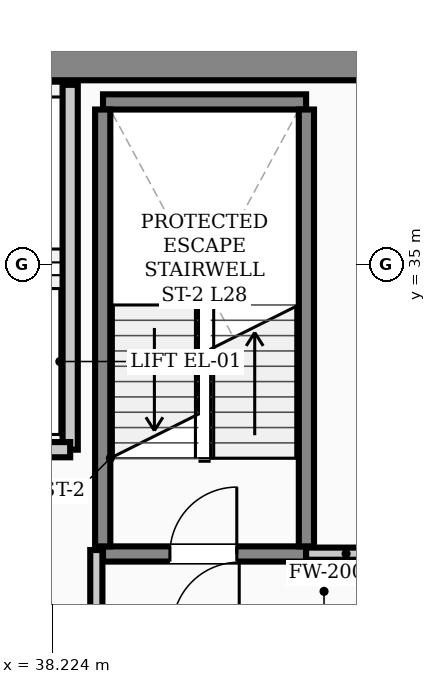
"""IFC4 building model, lengths in metres.
Left out: names, types, materials, properties, quantities, classifications, styles, units other than length and angle.
Written with IfcOpenShell. Run it as: python <this file> out.ifc"""

import sys

from ifc_helpers import new_model, si_unit, direction, frame, frame_2d, origin, place, context, subcontext, project, spatial, rectangle, extrude, element, fill, save


model = new_model("IFC4")
c1 = context("Model", 3, precision=1e-05, world=origin(), true_north=direction((0.0, 1.0)))
c2 = subcontext(c1, "Body", "Model", "MODEL_VIEW")
j1 = project(units=[si_unit("LENGTHUNIT", "METRE"), si_unit("PLANEANGLEUNIT", "RADIAN")], contexts=[c1])
p1 = place(None, origin())
s1 = spatial("IfcSite", under=j1, at=p1, CompositionType="ELEMENT")
p2 = place(p1, origin())
s2 = spatial("IfcBuilding", under=s1, at=p2, CompositionType="ELEMENT")
p3 = place(p2, frame((0.0, 0.0, 114.9)))
s3 = spatial("IfcBuildingStorey", under=s2, at=p3, CompositionType="ELEMENT", Elevation=114.9)
p4 = place(p3, frame((13.5, 38.3, 0.0), z_axis=(0.0, 0.0, 1.0), x_axis=(1.0, 0.0, 0.0)))
e1 = element("IfcWall", 1, at=p4, inside=s3, PredefinedType="SHEAR", context=c2, shape_type="SweptSolid", body=[
    extrude(rectangle(XDim=30.5, YDim=0.55, at=frame_2d((15.25, 0.0))), origin(), (0.0, 0.0, 1.0), 3.72),
])
p5 = place(p3, frame((39.06, 30.235, 0.0), z_axis=(0.0, 0.0, 1.0), x_axis=(1.0, 0.0, 0.0)))
e2 = element("IfcWall", 2, at=p5, inside=s3, PredefinedType="STANDARD", context=c2, shape_type="SweptSolid", body=[
    extrude(rectangle(XDim=3.34, YDim=0.25, at=frame_2d((1.67, 0.0))), origin(), (0.0, 0.0, 1.0), 3.72),
])
p6 = place(p5, frame((1.1, 0.0, 0.0)))
e3 = element("IfcOpeningElement", 3, at=p6, cuts=e2, PredefinedType="OPENING", context=c2, shape_type="SweptSolid", body=[
    extrude(rectangle(XDim=1.1, YDim=2.08, at=frame_2d((0.55, 1.04))), frame((0.0, 0.135, 0.0), z_axis=(0.0, -1.0, 0.0), x_axis=(1.0, 0.0, 0.0)), (0.0, 0.0, 1.0), 0.27),
])
p7 = place(p3, frame((39.06, 37.669, 0.0), z_axis=(0.0, 0.0, 1.0), x_axis=(1.0, 0.0, 0.0)))
e4 = element("IfcWall", 4, at=p7, inside=s3, PredefinedType="STANDARD", context=c2, shape_type="SweptSolid", body=[
    extrude(rectangle(XDim=3.34, YDim=0.25, at=frame_2d((1.67, 0.0))), origin(), (0.0, 0.0, 1.0), 3.72),
])
for number, where, z_axis, x_axis in (
    (5, (39.055, 30.36, 0.0), (0.0, 0.0, 1.0), (0.0, 1.0, 0.0)),
    (6, (42.405, 30.36, 0.0), (0.0, 0.0, 1.0), (0.0, 1.0, 0.0)),
):
    element("IfcWall", number, at=place(p3, frame(where, z_axis=z_axis, x_axis=x_axis)), inside=s3, PredefinedType="STANDARD", context=c2, shape_type="SweptSolid", body=[
        extrude(rectangle(XDim=7.184, YDim=0.25, at=frame_2d((3.592, 0.0))), origin(), (0.0, 0.0, 1.0), 3.72),
    ])
p8 = place(p3, frame((38.52, 31.95, 0.0), z_axis=(0.0, 0.0, 1.0), x_axis=(0.0, 1.0, 0.0)))
e7 = element("IfcWall", 7, at=p8, inside=s3, PredefinedType="STANDARD", context=c2, shape_type="SweptSolid", body=[
    extrude(rectangle(XDim=6.0, YDim=0.25, at=frame_2d((3.0, 0.0))), origin(), (0.0, 0.0, 1.0), 3.48),
])
p9 = place(p3, frame((36.62, 31.95, 0.0), z_axis=(0.0, 0.0, 1.0), x_axis=(1.0, 0.0, 0.0)))
e8 = element("IfcWall", 8, at=p9, inside=s3, PredefinedType="STANDARD", context=c2, shape_type="SweptSolid", body=[
    extrude(rectangle(XDim=1.9, YDim=0.25, at=frame_2d((0.95, 0.0))), origin(), (0.0, 0.0, 1.0), 3.48),
])
p10 = place(p3, frame((42.4, 30.24, 0.0), z_axis=(0.0, 0.0, 1.0), x_axis=(1.0, 0.0, 0.0)))
e9 = element("IfcWall", 9, at=p10, inside=s3, PredefinedType="STANDARD", context=c2, shape_type="SweptSolid", body=[
    extrude(rectangle(XDim=1.315, YDim=0.2, at=frame_2d((0.658, 0.0))), origin(), (0.0, 0.0, 1.0), 3.1),
])
p11 = place(p3, frame((38.95, 29.285, 0.0), z_axis=(0.0, 0.0, 1.0), x_axis=(0.0, 1.0, 0.0)))
e10 = element("IfcWall", 10, at=p11, inside=s3, PredefinedType="STANDARD", context=c2, shape_type="SweptSolid", body=[
    extrude(rectangle(XDim=1.015, YDim=0.2, at=frame_2d((0.508, 0.0))), origin(), (0.0, 0.0, 1.0), 3.3),
])
p12 = place(p6, origin())
e11 = element("IfcDoor", 11, at=p12, inside=s3, OperationType="SINGLE_SWING_RIGHT", PredefinedType="DOOR", context=c2, shape_type="SweptSolid", body=[
    extrude(rectangle(XDim=1.1, YDim=2.08, at=frame_2d((0.55, 1.04))), frame((0.0, 0.025, 0.0), z_axis=(0.0, -1.0, 0.0), x_axis=(1.0, 0.0, 0.0)), (0.0, 0.0, 1.0), 0.05),
])
fill(e3, e11)
save(model, sys.argv[1])
